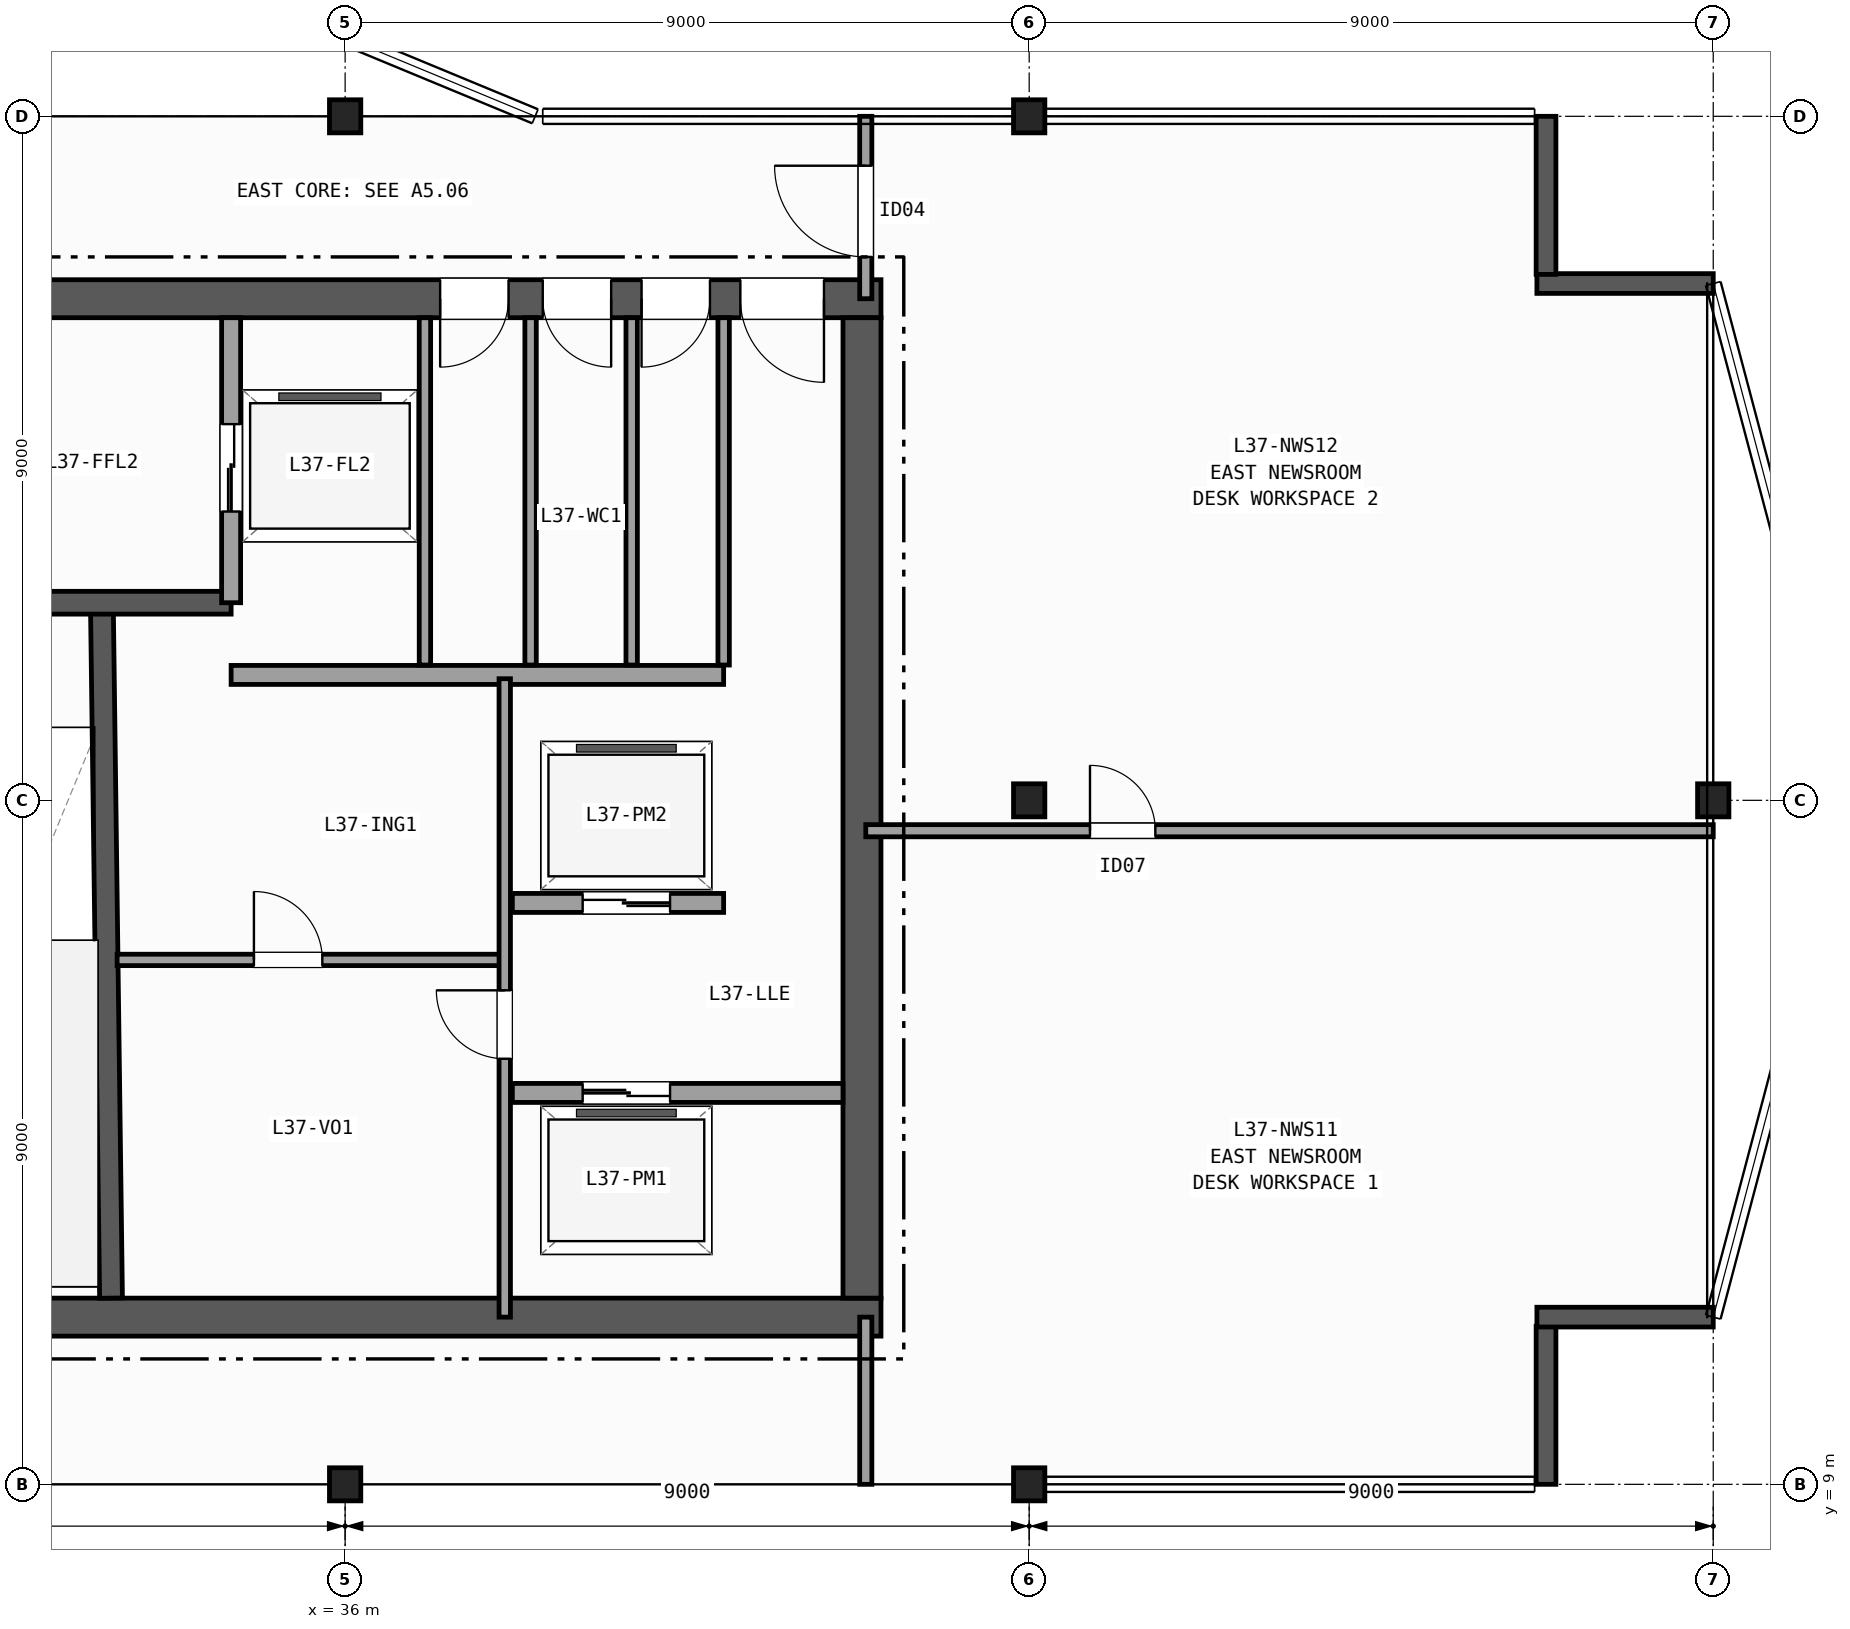
"""IFC4 building model, lengths in metres.
Left out: names, types, materials, properties, quantities, classifications, styles, units other than length and angle.
Written with IfcOpenShell. Run it as: python <this file> out.ifc"""

import sys

from ifc_helpers import new_model, si_unit, direction, frame, frame_2d, origin, origin_2d, place, context, subcontext, project, spatial, rectangle, i_section, extrude, element, fill, save


model = new_model("IFC4")
c1 = context("Model", 3, precision=1e-05, world=origin(), true_north=direction((0.0, 1.0)))
c2 = subcontext(c1, "Body", "Model", "MODEL_VIEW")
j1 = project(units=[si_unit("LENGTHUNIT", "METRE"), si_unit("PLANEANGLEUNIT", "RADIAN")], contexts=[c1])
p1 = place(None, origin())
s1 = spatial("IfcSite", under=j1, at=p1, CompositionType="ELEMENT")
p2 = place(p1, origin())
s2 = spatial("IfcBuilding", under=s1, at=p2, CompositionType="ELEMENT")
p3 = place(p2, frame((0.0, 0.0, 150.7)))
s3 = spatial("IfcBuildingStorey", under=s2, at=p3, CompositionType="ELEMENT", Elevation=150.7)
for number, where, z_axis, x_axis in (
    (1, (36.0, 9.0, 0.0), (0.0, 0.0, 1.0), (1.0, 0.0, 0.0)),
    (2, (36.0, 27.0, 0.0), (0.0, 0.0, 1.0), (1.0, 0.0, 0.0)),
    (3, (45.0, 9.0, 0.0), (0.0, 0.0, 1.0), (1.0, 0.0, 0.0)),
    (4, (45.0, 18.0, 0.0), (0.0, 0.0, 1.0), (1.0, 0.0, 0.0)),
    (5, (45.0, 27.0, 0.0), (0.0, 0.0, 1.0), (1.0, 0.0, 0.0)),
    (6, (54.0, 18.0, 0.0), (0.0, 0.0, 1.0), (1.0, 0.0, 0.0)),
):
    element("IfcColumn", number, at=place(p3, frame(where, z_axis=z_axis, x_axis=x_axis)), inside=s3, PredefinedType="COLUMN", context=c2, shape_type="SweptSolid", body=[
        extrude(i_section(OverallWidth=0.412, OverallDepth=0.435, WebThickness=0.036, FlangeThickness=0.057, FilletRadius=0.015, at=origin_2d()), origin(), (0.0, 0.0, 1.0), 3.7),
    ])
p4 = place(p3, frame((51.8, 9.0, 0.0), z_axis=(0.0, 0.0, 1.0), x_axis=(0.0, 1.0, 0.0)))
e7 = element("IfcWall", 7, at=p4, inside=s3, PredefinedType="SOLIDWALL", context=c2, shape_type="SweptSolid", body=[
    extrude(rectangle(XDim=2.08, YDim=0.26, at=frame_2d((1.04, 0.0))), origin(), (0.0, 0.0, 1.0), 3.42),
])
for number, where, z_axis, x_axis in (
    (8, (51.68, 11.2, 0.0), (0.0, 0.0, 1.0), (1.0, 0.0, 0.0)),
    (9, (54.0, 24.8, 0.0), (0.0, 0.0, 1.0), (-1.0, 0.0, 0.0)),
):
    element("IfcWall", number, at=place(p3, frame(where, z_axis=z_axis, x_axis=x_axis)), inside=s3, PredefinedType="SOLIDWALL", context=c2, shape_type="SweptSolid", body=[
        extrude(rectangle(XDim=2.32, YDim=0.26, at=frame_2d((1.16, 0.0))), origin(), (0.0, 0.0, 1.0), 3.42),
    ])
p5 = place(p3, frame((51.8, 24.92, 0.0), z_axis=(0.0, 0.0, 1.0), x_axis=(0.0, 1.0, 0.0)))
e10 = element("IfcWall", 10, at=p5, inside=s3, PredefinedType="SOLIDWALL", context=c2, shape_type="SweptSolid", body=[
    extrude(rectangle(XDim=2.08, YDim=0.26, at=frame_2d((1.04, 0.0))), origin(), (0.0, 0.0, 1.0), 3.42),
])
p6 = place(p3, frame((29.15, 11.2, 0.0), z_axis=(0.0, 0.0, 1.0), x_axis=(1.0, 0.0, 0.0)))
e11 = element("IfcWall", 11, at=p6, inside=s3, PredefinedType="SHEAR", context=c2, shape_type="SweptSolid", body=[
    extrude(rectangle(XDim=13.9, YDim=0.5, at=frame_2d((6.95, 0.0))), origin(), (0.0, 0.0, 1.0), 3.42),
])
p7 = place(p3, frame((43.05, 24.6, 0.0), z_axis=(0.0, 0.0, 1.0), x_axis=(-1.0, 0.0, 0.0)))
e12 = element("IfcWall", 12, at=p7, inside=s3, PredefinedType="SHEAR", context=c2, shape_type="SweptSolid", body=[
    extrude(rectangle(XDim=13.9, YDim=0.5, at=frame_2d((6.95, 0.0))), origin(), (0.0, 0.0, 1.0), 3.42),
])
p8 = place(p7, frame((0.75, 0.0, 0.0)))
e13 = element("IfcOpeningElement", 13, at=p8, cuts=e12, PredefinedType="OPENING", context=c2, shape_type="SweptSolid", body=[
    extrude(rectangle(XDim=1.1, YDim=2.15, at=frame_2d((0.55, 1.075))), frame((0.0, 0.26, 0.0), z_axis=(0.0, -1.0, 0.0), x_axis=(1.0, 0.0, 0.0)), (0.0, 0.0, 1.0), 0.52),
])
p9 = place(p7, frame((2.25, 0.0, 0.0)))
e14 = element("IfcOpeningElement", 14, at=p9, cuts=e12, PredefinedType="OPENING", context=c2, shape_type="SweptSolid", body=[
    extrude(rectangle(XDim=0.9, YDim=2.1, at=frame_2d((0.45, 1.05))), frame((0.0, 0.26, 0.0), z_axis=(0.0, -1.0, 0.0), x_axis=(1.0, 0.0, 0.0)), (0.0, 0.0, 1.0), 0.52),
])
p10 = place(p7, frame((3.55, 0.0, 0.0)))
e15 = element("IfcOpeningElement", 15, at=p10, cuts=e12, PredefinedType="OPENING", context=c2, shape_type="SweptSolid", body=[
    extrude(rectangle(XDim=0.9, YDim=2.1, at=frame_2d((0.45, 1.05))), frame((0.0, 0.26, 0.0), z_axis=(0.0, -1.0, 0.0), x_axis=(1.0, 0.0, 0.0)), (0.0, 0.0, 1.0), 0.52),
])
p11 = place(p7, frame((4.9, 0.0, 0.0)))
e16 = element("IfcOpeningElement", 16, at=p11, cuts=e12, PredefinedType="OPENING", context=c2, shape_type="SweptSolid", body=[
    extrude(rectangle(XDim=0.9, YDim=2.1, at=frame_2d((0.45, 1.05))), frame((0.0, 0.26, 0.0), z_axis=(0.0, -1.0, 0.0), x_axis=(1.0, 0.0, 0.0)), (0.0, 0.0, 1.0), 0.52),
])
p12 = place(p3, frame((42.8, 11.45, 0.0), z_axis=(0.0, 0.0, 1.0), x_axis=(0.0, 1.0, 0.0)))
e17 = element("IfcWall", 17, at=p12, inside=s3, PredefinedType="SHEAR", context=c2, shape_type="SweptSolid", body=[
    extrude(rectangle(XDim=12.9, YDim=0.5, at=frame_2d((6.45, 0.0))), origin(), (0.0, 0.0, 1.0), 3.42),
])
p13 = place(p3, frame((32.92, 11.45, 0.0), z_axis=(0.0, 0.0, 1.0), x_axis=(-0.013171578211, 0.999913251001, 0.0)))
e18 = element("IfcWall", 18, at=p13, inside=s3, PredefinedType="SHEAR", context=c2, shape_type="SweptSolid", body=[
    extrude(rectangle(XDim=9.101, YDim=0.3, at=frame_2d((4.55, 0.0))), origin(), (0.0, 0.0, 1.0), 3.42),
])
p14 = place(p3, frame((34.5, 20.6, 0.0), z_axis=(0.0, 0.0, 1.0), x_axis=(-1.0, 0.0, 0.0)))
e19 = element("IfcWall", 19, at=p14, inside=s3, PredefinedType="SHEAR", context=c2, shape_type="SweptSolid", body=[
    extrude(rectangle(XDim=4.85, YDim=0.3, at=frame_2d((2.425, 0.0))), origin(), (0.0, 0.0, 1.0), 3.42),
])
p15 = place(p14, frame((2.7, 0.0, 0.0)))
e20 = element("IfcOpeningElement", 20, at=p15, cuts=e19, PredefinedType="OPENING", context=c2, shape_type="SweptSolid", body=[
    extrude(rectangle(XDim=1.2, YDim=2.15, at=frame_2d((0.6, 1.075))), frame((0.0, 0.16, 0.0), z_axis=(0.0, -1.0, 0.0), x_axis=(1.0, 0.0, 0.0)), (0.0, 0.0, 1.0), 0.32),
])
p16 = place(p3, frame((34.5, 20.6, 0.0), z_axis=(0.0, 0.0, 1.0), x_axis=(0.0, 1.0, 0.0)))
e21 = element("IfcWall", 21, at=p16, inside=s3, PredefinedType="PARTITIONING", context=c2, shape_type="SweptSolid", body=[
    extrude(rectangle(XDim=3.75, YDim=0.25, at=frame_2d((1.875, 0.0))), origin(), (0.0, 0.0, 1.0), 3.42),
])
p17 = place(p16, frame((1.2, 0.0, 0.0)))
e22 = element("IfcOpeningElement", 22, at=p17, cuts=e21, PredefinedType="OPENING", context=c2, shape_type="SweptSolid", body=[
    extrude(rectangle(XDim=1.15, YDim=2.15, at=frame_2d((0.575, 1.075))), frame((0.0, 0.135, 0.0), z_axis=(0.0, -1.0, 0.0), x_axis=(1.0, 0.0, 0.0)), (0.0, 0.0, 1.0), 0.27),
])
p18 = place(p3, frame((34.5, 19.65, 0.0), z_axis=(0.0, 0.0, 1.0), x_axis=(1.0, 0.0, 0.0)))
e23 = element("IfcWall", 23, at=p18, inside=s3, PredefinedType="PARTITIONING", context=c2, shape_type="SweptSolid", body=[
    extrude(rectangle(XDim=6.48, YDim=0.25, at=frame_2d((3.24, 0.0))), origin(), (0.0, 0.0, 1.0), 3.42),
])
p19 = place(p3, frame((38.2, 14.15, 0.0), z_axis=(0.0, 0.0, 1.0), x_axis=(1.0, 0.0, 0.0)))
e24 = element("IfcWall", 24, at=p19, inside=s3, PredefinedType="PARTITIONING", context=c2, shape_type="SweptSolid", body=[
    extrude(rectangle(XDim=4.35, YDim=0.25, at=frame_2d((2.175, 0.0))), origin(), (0.0, 0.0, 1.0), 3.42),
])
p20 = place(p19, frame((0.925, 0.0, 0.0)))
e25 = element("IfcOpeningElement", 25, at=p20, cuts=e24, PredefinedType="OPENING", context=c2, shape_type="SweptSolid", body=[
    extrude(rectangle(XDim=1.15, YDim=2.15, at=frame_2d((0.575, 1.075))), frame((0.0, 0.135, 0.0), z_axis=(0.0, -1.0, 0.0), x_axis=(1.0, 0.0, 0.0)), (0.0, 0.0, 1.0), 0.27),
])
p21 = place(p3, frame((40.98, 16.65, 0.0), z_axis=(0.0, 0.0, 1.0), x_axis=(-1.0, 0.0, 0.0)))
e26 = element("IfcWall", 26, at=p21, inside=s3, PredefinedType="PARTITIONING", context=c2, shape_type="SweptSolid", body=[
    extrude(rectangle(XDim=2.78, YDim=0.25, at=frame_2d((1.39, 0.0))), origin(), (0.0, 0.0, 1.0), 3.42),
])
p22 = place(p21, frame((0.705, 0.0, 0.0)))
e27 = element("IfcOpeningElement", 27, at=p22, cuts=e26, PredefinedType="OPENING", context=c2, shape_type="SweptSolid", body=[
    extrude(rectangle(XDim=1.15, YDim=2.15, at=frame_2d((0.575, 1.075))), frame((0.0, 0.135, 0.0), z_axis=(0.0, -1.0, 0.0), x_axis=(1.0, 0.0, 0.0)), (0.0, 0.0, 1.0), 0.27),
])
p23 = place(p3, frame((33.0, 15.9, 0.0), z_axis=(0.0, 0.0, 1.0), x_axis=(1.0, 0.0, 0.0)))
e28 = element("IfcWall", 28, at=p23, inside=s3, PredefinedType="PARTITIONING", context=c2, shape_type="SweptSolid", body=[
    extrude(rectangle(XDim=5.1, YDim=0.15, at=frame_2d((2.55, 0.0))), origin(), (0.0, 0.0, 1.0), 3.42),
])
p24 = place(p23, frame((1.8, 0.0, 0.0)))
e29 = element("IfcOpeningElement", 29, at=p24, cuts=e28, PredefinedType="OPENING", context=c2, shape_type="SweptSolid", body=[
    extrude(rectangle(XDim=0.9, YDim=2.1, at=frame_2d((0.45, 1.05))), frame((0.0, 0.085, 0.0), z_axis=(0.0, -1.0, 0.0), x_axis=(1.0, 0.0, 0.0)), (0.0, 0.0, 1.0), 0.17),
])
p25 = place(p3, frame((38.1, 11.2, 0.0), z_axis=(0.0, 0.0, 1.0), x_axis=(0.0, 1.0, 0.0)))
e30 = element("IfcWall", 30, at=p25, inside=s3, PredefinedType="PARTITIONING", context=c2, shape_type="SweptSolid", body=[
    extrude(rectangle(XDim=8.4, YDim=0.15, at=frame_2d((4.2, 0.0))), origin(), (0.0, 0.0, 1.0), 3.42),
])
p26 = place(p25, frame((3.4, 0.0, 0.0)))
e31 = element("IfcOpeningElement", 31, at=p26, cuts=e30, PredefinedType="OPENING", context=c2, shape_type="SweptSolid", body=[
    extrude(rectangle(XDim=0.9, YDim=2.1, at=frame_2d((0.45, 1.05))), frame((0.0, 0.085, 0.0), z_axis=(0.0, -1.0, 0.0), x_axis=(1.0, 0.0, 0.0)), (0.0, 0.0, 1.0), 0.17),
])
for number, where, z_axis, x_axis in (
    (32, (37.05, 19.78, 0.0), (0.0, 0.0, 1.0), (0.0, 1.0, 0.0)),
    (33, (38.44, 19.78, 0.0), (0.0, 0.0, 1.0), (0.0, 1.0, 0.0)),
    (34, (39.77, 19.78, 0.0), (0.0, 0.0, 1.0), (0.0, 1.0, 0.0)),
    (35, (40.98, 19.78, 0.0), (0.0, 0.0, 1.0), (0.0, 1.0, 0.0)),
):
    element("IfcWall", number, at=place(p3, frame(where, z_axis=z_axis, x_axis=x_axis)), inside=s3, PredefinedType="PARTITIONING", context=c2, shape_type="SweptSolid", body=[
        extrude(rectangle(XDim=4.57, YDim=0.15, at=frame_2d((2.285, 0.0))), origin(), (0.0, 0.0, 1.0), 3.42),
    ])
p27 = place(p3, frame((42.85, 9.0, 0.0), z_axis=(0.0, 0.0, 1.0), x_axis=(0.0, 1.0, 0.0)))
e36 = element("IfcWall", 36, at=p27, inside=s3, PredefinedType="PARTITIONING", context=c2, shape_type="SweptSolid", body=[
    extrude(rectangle(XDim=2.2, YDim=0.16, at=frame_2d((1.1, 0.0))), origin(), (0.0, 0.0, 1.0), 2.634),
])
p28 = place(p3, frame((42.85, 24.6, 0.0), z_axis=(0.0, 0.0, 1.0), x_axis=(0.0, 1.0, 0.0)))
e37 = element("IfcWall", 37, at=p28, inside=s3, PredefinedType="PARTITIONING", context=c2, shape_type="SweptSolid", body=[
    extrude(rectangle(XDim=2.4, YDim=0.16, at=frame_2d((1.2, 0.0))), origin(), (0.0, 0.0, 1.0), 2.634),
])
p29 = place(p28, frame((0.55, 0.0, 0.0)))
e38 = element("IfcOpeningElement", 38, at=p29, cuts=e37, PredefinedType="OPENING", context=c2, shape_type="SweptSolid", body=[
    extrude(rectangle(XDim=1.2, YDim=2.15, at=frame_2d((0.6, 1.075))), frame((0.0, 0.09, 0.0), z_axis=(0.0, -1.0, 0.0), x_axis=(1.0, 0.0, 0.0)), (0.0, 0.0, 1.0), 0.18),
])
p30 = place(p3, frame((42.85, 17.6, 0.0), z_axis=(0.0, 0.0, 1.0), x_axis=(1.0, 0.0, 0.0)))
e39 = element("IfcWall", 39, at=p30, inside=s3, PredefinedType="PARTITIONING", context=c2, shape_type="SweptSolid", body=[
    extrude(rectangle(XDim=11.15, YDim=0.16, at=frame_2d((5.575, 0.0))), origin(), (0.0, 0.0, 1.0), 3.42),
])
p31 = place(p30, frame((2.95, 0.0, 0.0)))
e40 = element("IfcOpeningElement", 40, at=p31, cuts=e39, PredefinedType="OPENING", context=c2, shape_type="SweptSolid", body=[
    extrude(rectangle(XDim=0.86, YDim=2.05, at=frame_2d((0.43, 1.025))), frame((0.0, 0.09, 0.0), z_axis=(0.0, -1.0, 0.0), x_axis=(1.0, 0.0, 0.0)), (0.0, 0.0, 1.0), 0.18),
])
p32 = place(p8, origin())
e41 = element("IfcDoor", 41, at=p32, inside=s3, OperationType="SINGLE_SWING_LEFT", PredefinedType="DOOR", context=c2, shape_type="SweptSolid", body=[
    extrude(rectangle(XDim=1.1, YDim=2.15, at=frame_2d((0.55, 1.075))), frame((0.0, 0.025, 0.0), z_axis=(0.0, -1.0, 0.0), x_axis=(1.0, 0.0, 0.0)), (0.0, 0.0, 1.0), 0.05),
])
fill(e13, e41)
p33 = place(p9, origin())
e42 = element("IfcDoor", 42, at=p33, inside=s3, OperationType="SINGLE_SWING_RIGHT", PredefinedType="DOOR", context=c2, shape_type="SweptSolid", body=[
    extrude(rectangle(XDim=0.9, YDim=2.1, at=frame_2d((0.45, 1.05))), frame((0.0, 0.025, 0.0), z_axis=(0.0, -1.0, 0.0), x_axis=(1.0, 0.0, 0.0)), (0.0, 0.0, 1.0), 0.05),
])
fill(e14, e42)
p34 = place(p10, origin())
e43 = element("IfcDoor", 43, at=p34, inside=s3, OperationType="SINGLE_SWING_LEFT", PredefinedType="DOOR", context=c2, shape_type="SweptSolid", body=[
    extrude(rectangle(XDim=0.9, YDim=2.1, at=frame_2d((0.45, 1.05))), frame((0.0, 0.025, 0.0), z_axis=(0.0, -1.0, 0.0), x_axis=(1.0, 0.0, 0.0)), (0.0, 0.0, 1.0), 0.05),
])
fill(e15, e43)
p35 = place(p11, origin())
e44 = element("IfcDoor", 44, at=p35, inside=s3, OperationType="SINGLE_SWING_RIGHT", PredefinedType="DOOR", context=c2, shape_type="SweptSolid", body=[
    extrude(rectangle(XDim=0.9, YDim=2.1, at=frame_2d((0.45, 1.05))), frame((0.0, 0.025, 0.0), z_axis=(0.0, -1.0, 0.0), x_axis=(1.0, 0.0, 0.0)), (0.0, 0.0, 1.0), 0.05),
])
fill(e16, e44)
p36 = place(p17, origin())
e45 = element("IfcDoor", 45, at=p36, inside=s3, OperationType="DOUBLE_DOOR_SLIDING", PredefinedType="DOOR", context=c2, shape_type="SweptSolid", body=[
    extrude(rectangle(XDim=1.15, YDim=2.15, at=frame_2d((0.575, 1.075))), frame((0.0, 0.025, 0.0), z_axis=(0.0, -1.0, 0.0), x_axis=(1.0, 0.0, 0.0)), (0.0, 0.0, 1.0), 0.05),
])
fill(e22, e45)
p37 = place(p20, origin())
e46 = element("IfcDoor", 46, at=p37, inside=s3, OperationType="DOUBLE_DOOR_SLIDING", PredefinedType="DOOR", context=c2, shape_type="SweptSolid", body=[
    extrude(rectangle(XDim=1.15, YDim=2.15, at=frame_2d((0.575, 1.075))), frame((0.0, 0.025, 0.0), z_axis=(0.0, -1.0, 0.0), x_axis=(1.0, 0.0, 0.0)), (0.0, 0.0, 1.0), 0.05),
])
fill(e25, e46)
p38 = place(p22, origin())
e47 = element("IfcDoor", 47, at=p38, inside=s3, OperationType="DOUBLE_DOOR_SLIDING", PredefinedType="DOOR", context=c2, shape_type="SweptSolid", body=[
    extrude(rectangle(XDim=1.15, YDim=2.15, at=frame_2d((0.575, 1.075))), frame((0.0, 0.025, 0.0), z_axis=(0.0, -1.0, 0.0), x_axis=(1.0, 0.0, 0.0)), (0.0, 0.0, 1.0), 0.05),
])
fill(e27, e47)
p39 = place(p26, origin())
e48 = element("IfcDoor", 48, at=p39, inside=s3, OperationType="SINGLE_SWING_RIGHT", PredefinedType="DOOR", context=c2, shape_type="SweptSolid", body=[
    extrude(rectangle(XDim=0.9, YDim=2.1, at=frame_2d((0.45, 1.05))), frame((0.0, 0.025, 0.0), z_axis=(0.0, -1.0, 0.0), x_axis=(1.0, 0.0, 0.0)), (0.0, 0.0, 1.0), 0.05),
])
fill(e31, e48)
p40 = place(p24, origin())
e49 = element("IfcDoor", 49, at=p40, inside=s3, OperationType="SINGLE_SWING_LEFT", PredefinedType="DOOR", context=c2, shape_type="SweptSolid", body=[
    extrude(rectangle(XDim=0.9, YDim=2.1, at=frame_2d((0.45, 1.05))), frame((0.0, 0.025, 0.0), z_axis=(0.0, -1.0, 0.0), x_axis=(1.0, 0.0, 0.0)), (0.0, 0.0, 1.0), 0.05),
])
fill(e29, e49)
p41 = place(p29, origin())
e50 = element("IfcDoor", 50, at=p41, inside=s3, OperationType="SINGLE_SWING_RIGHT", PredefinedType="DOOR", context=c2, shape_type="SweptSolid", body=[
    extrude(rectangle(XDim=1.2, YDim=2.15, at=frame_2d((0.6, 1.075))), frame((0.0, 0.025, 0.0), z_axis=(0.0, -1.0, 0.0), x_axis=(1.0, 0.0, 0.0)), (0.0, 0.0, 1.0), 0.05),
])
fill(e38, e50)
p42 = place(p31, origin())
e51 = element("IfcDoor", 51, at=p42, inside=s3, OperationType="SINGLE_SWING_LEFT", PredefinedType="DOOR", context=c2, shape_type="SweptSolid", body=[
    extrude(rectangle(XDim=0.86, YDim=2.05, at=frame_2d((0.43, 1.025))), frame((0.0, 0.025, 0.0), z_axis=(0.0, -1.0, 0.0), x_axis=(1.0, 0.0, 0.0)), (0.0, 0.0, 1.0), 0.05),
])
fill(e40, e51)
save(model, sys.argv[1])
